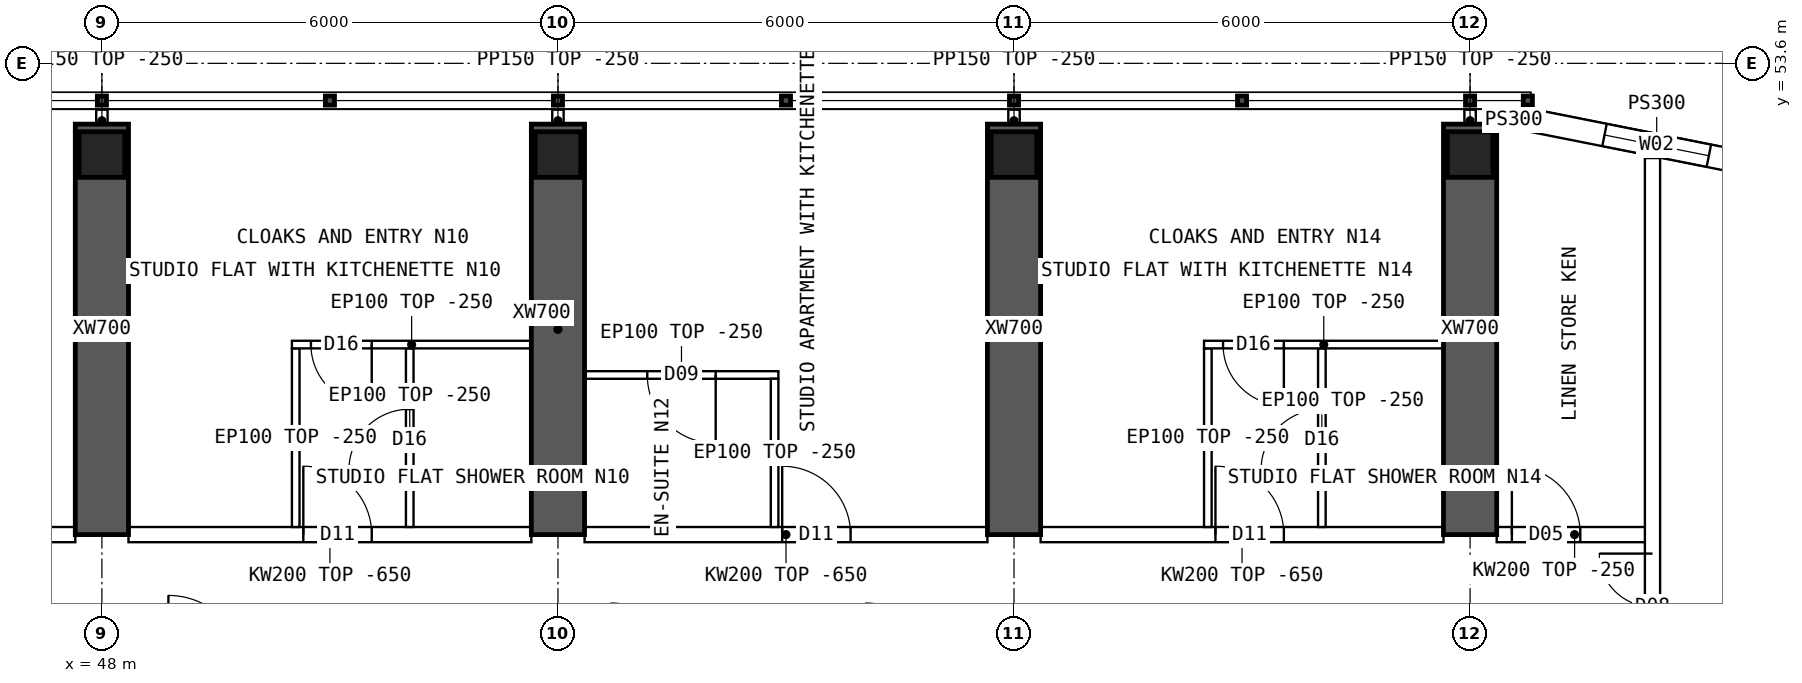
"""IFC4 building model, lengths in metres.
Left out: names, types, materials, properties, quantities, classifications, styles, units other than length and angle.
Written with IfcOpenShell. Run it as: python <this file> out.ifc"""

import sys

from ifc_helpers import new_model, si_unit, direction, frame, frame_2d, origin, origin_2d, place, context, subcontext, project, spatial, polyline, rectangle, hollow_rectangle, outline, extrude, element, fill, save


model = new_model("IFC4")
c1 = context("Model", 3, precision=1e-05, world=origin(), true_north=direction((0.0, 1.0)))
c2 = subcontext(c1, "Body", "Model", "MODEL_VIEW")
j1 = project(units=[si_unit("LENGTHUNIT", "METRE"), si_unit("PLANEANGLEUNIT", "RADIAN")], contexts=[c1])
p1 = place(None, origin())
s1 = spatial("IfcSite", under=j1, at=p1, CompositionType="ELEMENT")
p2 = place(p1, origin())
s2 = spatial("IfcBuilding", under=s1, at=p2, CompositionType="ELEMENT")
p3 = place(p2, frame((0.0, 0.0, 224.05)))
s3 = spatial("IfcBuildingStorey", under=s2, at=p3, CompositionType="ELEMENT", Elevation=224.05)
for number, where, z_axis, x_axis in (
    (1, (48.0, 52.4, 0.0), (0.0, 0.0, 1.0), (1.0, 0.0, 0.0)),
    (2, (54.0, 52.4, 0.0), (0.0, 0.0, 1.0), (1.0, 0.0, 0.0)),
    (3, (60.0, 52.4, 0.0), (0.0, 0.0, 1.0), (1.0, 0.0, 0.0)),
    (4, (66.0, 52.4, 0.0), (0.0, 0.0, 1.0), (1.0, 0.0, 0.0)),
):
    element("IfcColumn", number, at=place(p3, frame(where, z_axis=z_axis, x_axis=x_axis)), inside=s3, PredefinedType="COLUMN", context=c2, shape_type="SweptSolid", body=[
        extrude(hollow_rectangle(XDim=0.6, YDim=0.6, WallThickness=0.06, at=origin_2d()), origin(), (0.0, 0.0, 1.0), 3.75),
    ])
for number, where, z_axis, x_axis in (
    (5, (48.0, 47.4, 0.0), (0.0, 0.0, 1.0), (0.0, 1.0, 0.0)),
    (6, (54.0, 47.4, 0.0), (0.0, 0.0, 1.0), (0.0, 1.0, 0.0)),
    (7, (60.0, 47.4, 0.0), (0.0, 0.0, 1.0), (0.0, 1.0, 0.0)),
    (8, (66.0, 47.4, 0.0), (0.0, 0.0, 1.0), (0.0, 1.0, 0.0)),
):
    element("IfcWall", number, at=place(p3, frame(where, z_axis=z_axis, x_axis=x_axis)), inside=s3, PredefinedType="SHEAR", context=c2, shape_type="SweptSolid", body=[
        extrude(rectangle(XDim=5.4, YDim=0.7, at=frame_2d((2.7, 0.0))), origin(), (0.0, 0.0, 1.0), 3.75),
    ])
p4 = place(p3, frame((70.11, 52.192, 0.0), z_axis=(0.0, 0.0, 1.0), x_axis=(-0.98078325777, 0.195100490205, 0.0)))
e9 = element("IfcWall", 9, at=p4, inside=s3, PredefinedType="SOLIDWALL", context=c2, shape_type="SweptSolid", body=[
    extrude(outline(polyline([(-0.03, -0.15), (3.405, -0.15), (3.345, 0.15), (0.03, 0.15), (-0.03, -0.15)])), origin(), (0.0, 0.0, 1.0), 3.5),
])
p5 = place(p4, frame((0.988, 0.0, 0.9)))
e10 = element("IfcOpeningElement", 10, at=p5, cuts=e9, PredefinedType="OPENING", context=c2, shape_type="SweptSolid", body=[
    extrude(rectangle(XDim=1.4, YDim=1.8, at=frame_2d((0.7, 0.9))), frame((0.0, 0.16, 0.0), z_axis=(0.0, -1.0, 0.0), x_axis=(1.0, 0.0, 0.0)), (0.0, 0.0, 1.0), 0.32),
])
p6 = place(p3, frame((66.8, 52.85, 0.0), z_axis=(0.0, 0.0, 1.0), x_axis=(-1.0, 0.0, 0.0)))
e11 = element("IfcWall", 11, at=p6, inside=s3, PredefinedType="SOLIDWALL", context=c2, shape_type="SweptSolid", body=[
    extrude(rectangle(XDim=0.45, YDim=0.3, at=frame_2d((0.225, 0.0))), origin(), (0.0, 0.0, 1.0), 3.5),
])
p7 = place(p3, frame((42.35, 47.4, 0.0), z_axis=(0.0, 0.0, 1.0), x_axis=(1.0, 0.0, 0.0)))
e12 = element("IfcWall", 12, at=p7, inside=s3, PredefinedType="SOLIDWALL", context=c2, shape_type="SweptSolid", body=[
    extrude(outline(polyline([(0.0, 0.0), (5.3, 0.0), (5.3, 3.1), (0.0, 3.1), (0.0, 0.0)])), frame((0.0, 0.1, 0.0), z_axis=(0.0, -1.0, 0.0), x_axis=(1.0, 0.0, 0.0)), (0.0, 0.0, 1.0), 0.2),
])
p8 = place(p7, frame((2.6, 0.0, 0.0)))
e13 = element("IfcOpeningElement", 13, at=p8, cuts=e12, PredefinedType="OPENING", context=c2, shape_type="SweptSolid", body=[
    extrude(rectangle(XDim=0.9, YDim=2.1, at=frame_2d((0.45, 1.05))), frame((0.0, 0.11, 0.0), z_axis=(0.0, -1.0, 0.0), x_axis=(1.0, 0.0, 0.0)), (0.0, 0.0, 1.0), 0.22),
])
p9 = place(p3, frame((48.35, 47.4, 0.0), z_axis=(0.0, 0.0, 1.0), x_axis=(1.0, 0.0, 0.0)))
e14 = element("IfcWall", 14, at=p9, inside=s3, PredefinedType="SOLIDWALL", context=c2, shape_type="SweptSolid", body=[
    extrude(outline(polyline([(0.0, 0.0), (5.3, 0.0), (5.3, 3.1), (0.0, 3.1), (0.0, 0.0)])), frame((0.0, 0.1, 0.0), z_axis=(0.0, -1.0, 0.0), x_axis=(1.0, 0.0, 0.0)), (0.0, 0.0, 1.0), 0.2),
])
p10 = place(p9, frame((2.3, 0.0, 0.0)))
e15 = element("IfcOpeningElement", 15, at=p10, cuts=e14, PredefinedType="OPENING", context=c2, shape_type="SweptSolid", body=[
    extrude(rectangle(XDim=0.9, YDim=2.1, at=frame_2d((0.45, 1.05))), frame((0.0, 0.11, 0.0), z_axis=(0.0, -1.0, 0.0), x_axis=(1.0, 0.0, 0.0)), (0.0, 0.0, 1.0), 0.22),
])
p11 = place(p3, frame((54.35, 47.4, 0.0), z_axis=(0.0, 0.0, 1.0), x_axis=(1.0, 0.0, 0.0)))
e16 = element("IfcWall", 16, at=p11, inside=s3, PredefinedType="SOLIDWALL", context=c2, shape_type="SweptSolid", body=[
    extrude(outline(polyline([(0.0, 0.0), (5.3, 0.0), (5.3, 3.1), (0.0, 3.1), (0.0, 0.0)])), frame((0.0, 0.1, 0.0), z_axis=(0.0, -1.0, 0.0), x_axis=(1.0, 0.0, 0.0)), (0.0, 0.0, 1.0), 0.2),
])
p12 = place(p11, frame((2.6, 0.0, 0.0)))
e17 = element("IfcOpeningElement", 17, at=p12, cuts=e16, PredefinedType="OPENING", context=c2, shape_type="SweptSolid", body=[
    extrude(rectangle(XDim=0.9, YDim=2.1, at=frame_2d((0.45, 1.05))), frame((0.0, 0.11, 0.0), z_axis=(0.0, -1.0, 0.0), x_axis=(1.0, 0.0, 0.0)), (0.0, 0.0, 1.0), 0.22),
])
p13 = place(p3, frame((60.35, 47.4, 0.0), z_axis=(0.0, 0.0, 1.0), x_axis=(1.0, 0.0, 0.0)))
e18 = element("IfcWall", 18, at=p13, inside=s3, PredefinedType="SOLIDWALL", context=c2, shape_type="SweptSolid", body=[
    extrude(outline(polyline([(0.0, 0.0), (5.3, 0.0), (5.3, 3.1), (0.0, 3.1), (0.0, 0.0)])), frame((0.0, 0.1, 0.0), z_axis=(0.0, -1.0, 0.0), x_axis=(1.0, 0.0, 0.0)), (0.0, 0.0, 1.0), 0.2),
])
p14 = place(p13, frame((2.3, 0.0, 0.0)))
e19 = element("IfcOpeningElement", 19, at=p14, cuts=e18, PredefinedType="OPENING", context=c2, shape_type="SweptSolid", body=[
    extrude(rectangle(XDim=0.9, YDim=2.1, at=frame_2d((0.45, 1.05))), frame((0.0, 0.11, 0.0), z_axis=(0.0, -1.0, 0.0), x_axis=(1.0, 0.0, 0.0)), (0.0, 0.0, 1.0), 0.22),
])
p15 = place(p3, frame((66.35, 47.4, 0.0), z_axis=(0.0, 0.0, 1.0), x_axis=(1.0, 0.0, 0.0)))
e20 = element("IfcWall", 20, at=p15, inside=s3, PredefinedType="SOLIDWALL", context=c2, shape_type="SweptSolid", body=[
    extrude(rectangle(XDim=2.05, YDim=0.2, at=frame_2d((1.025, 0.0))), origin(), (0.0, 0.0, 1.0), 3.5),
])
p16 = place(p15, frame((0.2, 0.0, 0.0)))
e21 = element("IfcOpeningElement", 21, at=p16, cuts=e20, PredefinedType="OPENING", context=c2, shape_type="SweptSolid", body=[
    extrude(rectangle(XDim=0.9, YDim=2.1, at=frame_2d((0.45, 1.05))), frame((0.0, 0.11, 0.0), z_axis=(0.0, -1.0, 0.0), x_axis=(1.0, 0.0, 0.0)), (0.0, 0.0, 1.0), 0.22),
])
p17 = place(p3, frame((50.5, 49.9, 0.0), z_axis=(0.0, 0.0, 1.0), x_axis=(1.0, 0.0, 0.0)))
e22 = element("IfcWall", 22, at=p17, inside=s3, PredefinedType="PARTITIONING", context=c2, shape_type="SweptSolid", body=[
    extrude(rectangle(XDim=3.15, YDim=0.1, at=frame_2d((1.575, 0.0))), origin(), (0.0, 0.0, 1.0), 3.5),
])
p18 = place(p17, frame((0.25, 0.0, 0.0)))
e23 = element("IfcOpeningElement", 23, at=p18, cuts=e22, PredefinedType="OPENING", context=c2, shape_type="SweptSolid", body=[
    extrude(rectangle(XDim=0.8, YDim=2.1, at=frame_2d((0.4, 1.05))), frame((0.0, 0.06, 0.0), z_axis=(0.0, -1.0, 0.0), x_axis=(1.0, 0.0, 0.0)), (0.0, 0.0, 1.0), 0.12),
])
p19 = place(p3, frame((50.55, 49.85, 0.0), z_axis=(0.0, 0.0, 1.0), x_axis=(0.0, -1.0, 0.0)))
e24 = element("IfcWall", 24, at=p19, inside=s3, PredefinedType="PARTITIONING", context=c2, shape_type="SweptSolid", body=[
    extrude(outline(polyline([(0.0, 0.0), (2.35, 0.0), (2.35, 3.1), (2.302, 3.1), (2.3, 3.5), (0.0, 3.5), (0.0, 0.0)])), frame((0.0, 0.05, 0.0), z_axis=(0.0, -1.0, 0.0), x_axis=(1.0, 0.0, 0.0)), (0.0, 0.0, 1.0), 0.1),
])
p20 = place(p3, frame((52.05, 49.85, 0.0), z_axis=(0.0, 0.0, 1.0), x_axis=(0.0, -1.0, 0.0)))
e25 = element("IfcWall", 25, at=p20, inside=s3, PredefinedType="PARTITIONING", context=c2, shape_type="SweptSolid", body=[
    extrude(outline(polyline([(0.0, 0.0), (2.35, 0.0), (2.35, 3.1), (2.302, 3.1), (2.3, 3.5), (0.0, 3.5), (0.0, 0.0)])), frame((0.0, 0.05, 0.0), z_axis=(0.0, -1.0, 0.0), x_axis=(1.0, 0.0, 0.0)), (0.0, 0.0, 1.0), 0.1),
])
p21 = place(p20, frame((0.8, 0.0, 0.0)))
e26 = element("IfcOpeningElement", 26, at=p21, cuts=e25, PredefinedType="OPENING", context=c2, shape_type="SweptSolid", body=[
    extrude(rectangle(XDim=0.8, YDim=2.1, at=frame_2d((0.4, 1.05))), frame((0.0, 0.06, 0.0), z_axis=(0.0, -1.0, 0.0), x_axis=(1.0, 0.0, 0.0)), (0.0, 0.0, 1.0), 0.12),
])
p22 = place(p3, frame((54.35, 49.5, 0.0), z_axis=(0.0, 0.0, 1.0), x_axis=(1.0, 0.0, 0.0)))
e27 = element("IfcWall", 27, at=p22, inside=s3, PredefinedType="PARTITIONING", context=c2, shape_type="SweptSolid", body=[
    extrude(rectangle(XDim=2.55, YDim=0.1, at=frame_2d((1.275, 0.0))), origin(), (0.0, 0.0, 1.0), 3.5),
])
p23 = place(p22, frame((0.825, 0.0, 0.0)))
e28 = element("IfcOpeningElement", 28, at=p23, cuts=e27, PredefinedType="OPENING", context=c2, shape_type="SweptSolid", body=[
    extrude(rectangle(XDim=0.9, YDim=2.1, at=frame_2d((0.45, 1.05))), frame((0.0, 0.06, 0.0), z_axis=(0.0, -1.0, 0.0), x_axis=(1.0, 0.0, 0.0)), (0.0, 0.0, 1.0), 0.12),
])
p24 = place(p3, frame((56.85, 49.45, 0.0), z_axis=(0.0, 0.0, 1.0), x_axis=(0.0, -1.0, 0.0)))
e29 = element("IfcWall", 29, at=p24, inside=s3, PredefinedType="PARTITIONING", context=c2, shape_type="SweptSolid", body=[
    extrude(outline(polyline([(0.0, 0.0), (1.95, 0.0), (1.95, 3.1), (1.902, 3.1), (1.9, 3.5), (0.0, 3.5), (0.0, 0.0)])), frame((0.0, 0.05, 0.0), z_axis=(0.0, -1.0, 0.0), x_axis=(1.0, 0.0, 0.0)), (0.0, 0.0, 1.0), 0.1),
])
p25 = place(p3, frame((62.5, 49.9, 0.0), z_axis=(0.0, 0.0, 1.0), x_axis=(1.0, 0.0, 0.0)))
e30 = element("IfcWall", 30, at=p25, inside=s3, PredefinedType="PARTITIONING", context=c2, shape_type="SweptSolid", body=[
    extrude(rectangle(XDim=3.15, YDim=0.1, at=frame_2d((1.575, 0.0))), origin(), (0.0, 0.0, 1.0), 3.5),
])
p26 = place(p25, frame((0.25, 0.0, 0.0)))
e31 = element("IfcOpeningElement", 31, at=p26, cuts=e30, PredefinedType="OPENING", context=c2, shape_type="SweptSolid", body=[
    extrude(rectangle(XDim=0.8, YDim=2.1, at=frame_2d((0.4, 1.05))), frame((0.0, 0.06, 0.0), z_axis=(0.0, -1.0, 0.0), x_axis=(1.0, 0.0, 0.0)), (0.0, 0.0, 1.0), 0.12),
])
p27 = place(p3, frame((62.55, 49.85, 0.0), z_axis=(0.0, 0.0, 1.0), x_axis=(0.0, -1.0, 0.0)))
e32 = element("IfcWall", 32, at=p27, inside=s3, PredefinedType="PARTITIONING", context=c2, shape_type="SweptSolid", body=[
    extrude(outline(polyline([(0.0, 0.0), (2.35, 0.0), (2.35, 3.1), (2.302, 3.1), (2.3, 3.5), (0.0, 3.5), (0.0, 0.0)])), frame((0.0, 0.05, 0.0), z_axis=(0.0, -1.0, 0.0), x_axis=(1.0, 0.0, 0.0)), (0.0, 0.0, 1.0), 0.1),
])
p28 = place(p3, frame((64.05, 49.85, 0.0), z_axis=(0.0, 0.0, 1.0), x_axis=(0.0, -1.0, 0.0)))
e33 = element("IfcWall", 33, at=p28, inside=s3, PredefinedType="PARTITIONING", context=c2, shape_type="SweptSolid", body=[
    extrude(outline(polyline([(0.0, 0.0), (2.35, 0.0), (2.35, 3.1), (2.302, 3.1), (2.3, 3.5), (0.0, 3.5), (0.0, 0.0)])), frame((0.0, 0.05, 0.0), z_axis=(0.0, -1.0, 0.0), x_axis=(1.0, 0.0, 0.0)), (0.0, 0.0, 1.0), 0.1),
])
p29 = place(p28, frame((0.8, 0.0, 0.0)))
e34 = element("IfcOpeningElement", 34, at=p29, cuts=e33, PredefinedType="OPENING", context=c2, shape_type="SweptSolid", body=[
    extrude(rectangle(XDim=0.8, YDim=2.1, at=frame_2d((0.4, 1.05))), frame((0.0, 0.06, 0.0), z_axis=(0.0, -1.0, 0.0), x_axis=(1.0, 0.0, 0.0)), (0.0, 0.0, 1.0), 0.12),
])
p30 = place(p3, frame((68.4, 11.646, 0.0), z_axis=(0.0, 0.0, 1.0), x_axis=(0.0, 1.0, 0.0)))
e35 = element("IfcWall", 35, at=p30, inside=s3, PredefinedType="SOLIDWALL", context=c2, shape_type="SweptSolid", body=[
    extrude(rectangle(XDim=40.708, YDim=0.2, at=frame_2d((20.354, 0.0))), origin(), (0.0, 0.0, 1.0), 3.5),
])
p31 = place(p30, frame((13.434, 0.0, 0.0)))
e36 = element("IfcOpeningElement", 36, at=p31, cuts=e35, PredefinedType="OPENING", context=c2, shape_type="SweptSolid", body=[
    extrude(rectangle(XDim=1.2, YDim=2.1, at=frame_2d((0.6, 1.05))), frame((0.0, 0.11, 0.0), z_axis=(0.0, -1.0, 0.0), x_axis=(1.0, 0.0, 0.0)), (0.0, 0.0, 1.0), 0.22),
])
p32 = place(p30, frame((21.194, 0.0, 0.0)))
e37 = element("IfcOpeningElement", 37, at=p32, cuts=e35, PredefinedType="OPENING", context=c2, shape_type="SweptSolid", body=[
    extrude(rectangle(XDim=1.2, YDim=2.1, at=frame_2d((0.6, 1.05))), frame((0.0, 0.11, 0.0), z_axis=(0.0, -1.0, 0.0), x_axis=(1.0, 0.0, 0.0)), (0.0, 0.0, 1.0), 0.22),
])
p33 = place(p30, frame((5.104, 0.0, 0.0)))
e38 = element("IfcOpeningElement", 38, at=p33, cuts=e35, PredefinedType="OPENING", context=c2, shape_type="SweptSolid", body=[
    extrude(rectangle(XDim=1.4, YDim=2.1, at=frame_2d((0.7, 1.05))), frame((0.0, 0.11, 0.0), z_axis=(0.0, -1.0, 0.0), x_axis=(1.0, 0.0, 0.0)), (0.0, 0.0, 1.0), 0.22),
])
p34 = place(p30, frame((34.104, 0.0, 0.0)))
e39 = element("IfcOpeningElement", 39, at=p34, cuts=e35, PredefinedType="OPENING", context=c2, shape_type="SweptSolid", body=[
    extrude(rectangle(XDim=1.4, YDim=2.1, at=frame_2d((0.7, 1.05))), frame((0.0, 0.11, 0.0), z_axis=(0.0, -1.0, 0.0), x_axis=(1.0, 0.0, 0.0)), (0.0, 0.0, 1.0), 0.22),
])
for number, where, z_axis, x_axis in (
    (40, (48.0, 52.7, 0.0), (0.0, 0.0, 1.0), (0.0, 1.0, 0.0)),
    (41, (54.0, 52.7, 0.0), (0.0, 0.0, 1.0), (0.0, 1.0, 0.0)),
    (42, (60.0, 52.7, 0.0), (0.0, 0.0, 1.0), (0.0, 1.0, 0.0)),
    (43, (66.0, 52.7, 0.0), (0.0, 0.0, 1.0), (0.0, 1.0, 0.0)),
):
    element("IfcWall", number, at=place(p3, frame(where, z_axis=z_axis, x_axis=x_axis)), inside=s3, PredefinedType="PARTITIONING", context=c2, shape_type="SweptSolid", body=[
        extrude(rectangle(XDim=0.29, YDim=0.15, at=frame_2d((0.145, 0.0))), origin(), (0.0, 0.0, 1.0), 3.5),
    ])
p35 = place(p5, origin())
e44 = element("IfcWindow", 44, at=p35, inside=s3, PartitioningType="SINGLE_PANEL", PredefinedType="WINDOW", context=c2, shape_type="SweptSolid", body=[
    extrude(rectangle(XDim=1.4, YDim=1.8, at=frame_2d((0.7, 0.9))), frame((0.0, 0.03, 0.0), z_axis=(0.0, -1.0, 0.0), x_axis=(1.0, 0.0, 0.0)), (0.0, 0.0, 1.0), 0.06),
])
fill(e10, e44)
p36 = place(p18, origin())
e45 = element("IfcDoor", 45, at=p36, inside=s3, OperationType="SINGLE_SWING_RIGHT", PredefinedType="DOOR", context=c2, shape_type="SweptSolid", body=[
    extrude(rectangle(XDim=0.8, YDim=2.1, at=frame_2d((0.4, 1.05))), frame((0.0, 0.025, 0.0), z_axis=(0.0, -1.0, 0.0), x_axis=(1.0, 0.0, 0.0)), (0.0, 0.0, 1.0), 0.05),
])
fill(e23, e45)
p37 = place(p21, origin())
e46 = element("IfcDoor", 46, at=p37, inside=s3, OperationType="SINGLE_SWING_RIGHT", PredefinedType="DOOR", context=c2, shape_type="SweptSolid", body=[
    extrude(rectangle(XDim=0.8, YDim=2.1, at=frame_2d((0.4, 1.05))), frame((0.0, 0.025, 0.0), z_axis=(0.0, -1.0, 0.0), x_axis=(1.0, 0.0, 0.0)), (0.0, 0.0, 1.0), 0.05),
])
fill(e26, e46)
p38 = place(p10, origin())
e47 = element("IfcDoor", 47, at=p38, inside=s3, OperationType="SINGLE_SWING_LEFT", PredefinedType="DOOR", context=c2, shape_type="SweptSolid", body=[
    extrude(rectangle(XDim=0.9, YDim=2.1, at=frame_2d((0.45, 1.05))), frame((0.0, 0.025, 0.0), z_axis=(0.0, -1.0, 0.0), x_axis=(1.0, 0.0, 0.0)), (0.0, 0.0, 1.0), 0.05),
])
fill(e15, e47)
p39 = place(p23, origin())
e48 = element("IfcDoor", 48, at=p39, inside=s3, OperationType="SINGLE_SWING_RIGHT", PredefinedType="DOOR", context=c2, shape_type="SweptSolid", body=[
    extrude(rectangle(XDim=0.9, YDim=2.1, at=frame_2d((0.45, 1.05))), frame((0.0, 0.025, 0.0), z_axis=(0.0, -1.0, 0.0), x_axis=(1.0, 0.0, 0.0)), (0.0, 0.0, 1.0), 0.05),
])
fill(e28, e48)
p40 = place(p12, origin())
e49 = element("IfcDoor", 49, at=p40, inside=s3, OperationType="SINGLE_SWING_LEFT", PredefinedType="DOOR", context=c2, shape_type="SweptSolid", body=[
    extrude(rectangle(XDim=0.9, YDim=2.1, at=frame_2d((0.45, 1.05))), frame((0.0, 0.025, 0.0), z_axis=(0.0, -1.0, 0.0), x_axis=(1.0, 0.0, 0.0)), (0.0, 0.0, 1.0), 0.05),
])
fill(e17, e49)
p41 = place(p26, origin())
e50 = element("IfcDoor", 50, at=p41, inside=s3, OperationType="SINGLE_SWING_RIGHT", PredefinedType="DOOR", context=c2, shape_type="SweptSolid", body=[
    extrude(rectangle(XDim=0.8, YDim=2.1, at=frame_2d((0.4, 1.05))), frame((0.0, 0.025, 0.0), z_axis=(0.0, -1.0, 0.0), x_axis=(1.0, 0.0, 0.0)), (0.0, 0.0, 1.0), 0.05),
])
fill(e31, e50)
p42 = place(p29, origin())
e51 = element("IfcDoor", 51, at=p42, inside=s3, OperationType="SINGLE_SWING_RIGHT", PredefinedType="DOOR", context=c2, shape_type="SweptSolid", body=[
    extrude(rectangle(XDim=0.8, YDim=2.1, at=frame_2d((0.4, 1.05))), frame((0.0, 0.025, 0.0), z_axis=(0.0, -1.0, 0.0), x_axis=(1.0, 0.0, 0.0)), (0.0, 0.0, 1.0), 0.05),
])
fill(e34, e51)
p43 = place(p14, origin())
e52 = element("IfcDoor", 52, at=p43, inside=s3, OperationType="SINGLE_SWING_LEFT", PredefinedType="DOOR", context=c2, shape_type="SweptSolid", body=[
    extrude(rectangle(XDim=0.9, YDim=2.1, at=frame_2d((0.45, 1.05))), frame((0.0, 0.025, 0.0), z_axis=(0.0, -1.0, 0.0), x_axis=(1.0, 0.0, 0.0)), (0.0, 0.0, 1.0), 0.05),
])
fill(e19, e52)
p44 = place(p34, origin())
e53 = element("IfcDoor", 53, at=p44, inside=s3, OperationType="DOUBLE_DOOR_SINGLE_SWING", PredefinedType="DOOR", context=c2, shape_type="SweptSolid", body=[
    extrude(rectangle(XDim=1.4, YDim=2.1, at=frame_2d((0.7, 1.05))), frame((0.0, 0.025, 0.0), z_axis=(0.0, -1.0, 0.0), x_axis=(1.0, 0.0, 0.0)), (0.0, 0.0, 1.0), 0.05),
])
fill(e39, e53)
p45 = place(p16, origin())
e54 = element("IfcDoor", 54, at=p45, inside=s3, OperationType="SINGLE_SWING_LEFT", PredefinedType="DOOR", context=c2, shape_type="SweptSolid", body=[
    extrude(rectangle(XDim=0.9, YDim=2.1, at=frame_2d((0.45, 1.05))), frame((0.0, 0.025, 0.0), z_axis=(0.0, -1.0, 0.0), x_axis=(1.0, 0.0, 0.0)), (0.0, 0.0, 1.0), 0.05),
])
fill(e21, e54)
save(model, sys.argv[1])
